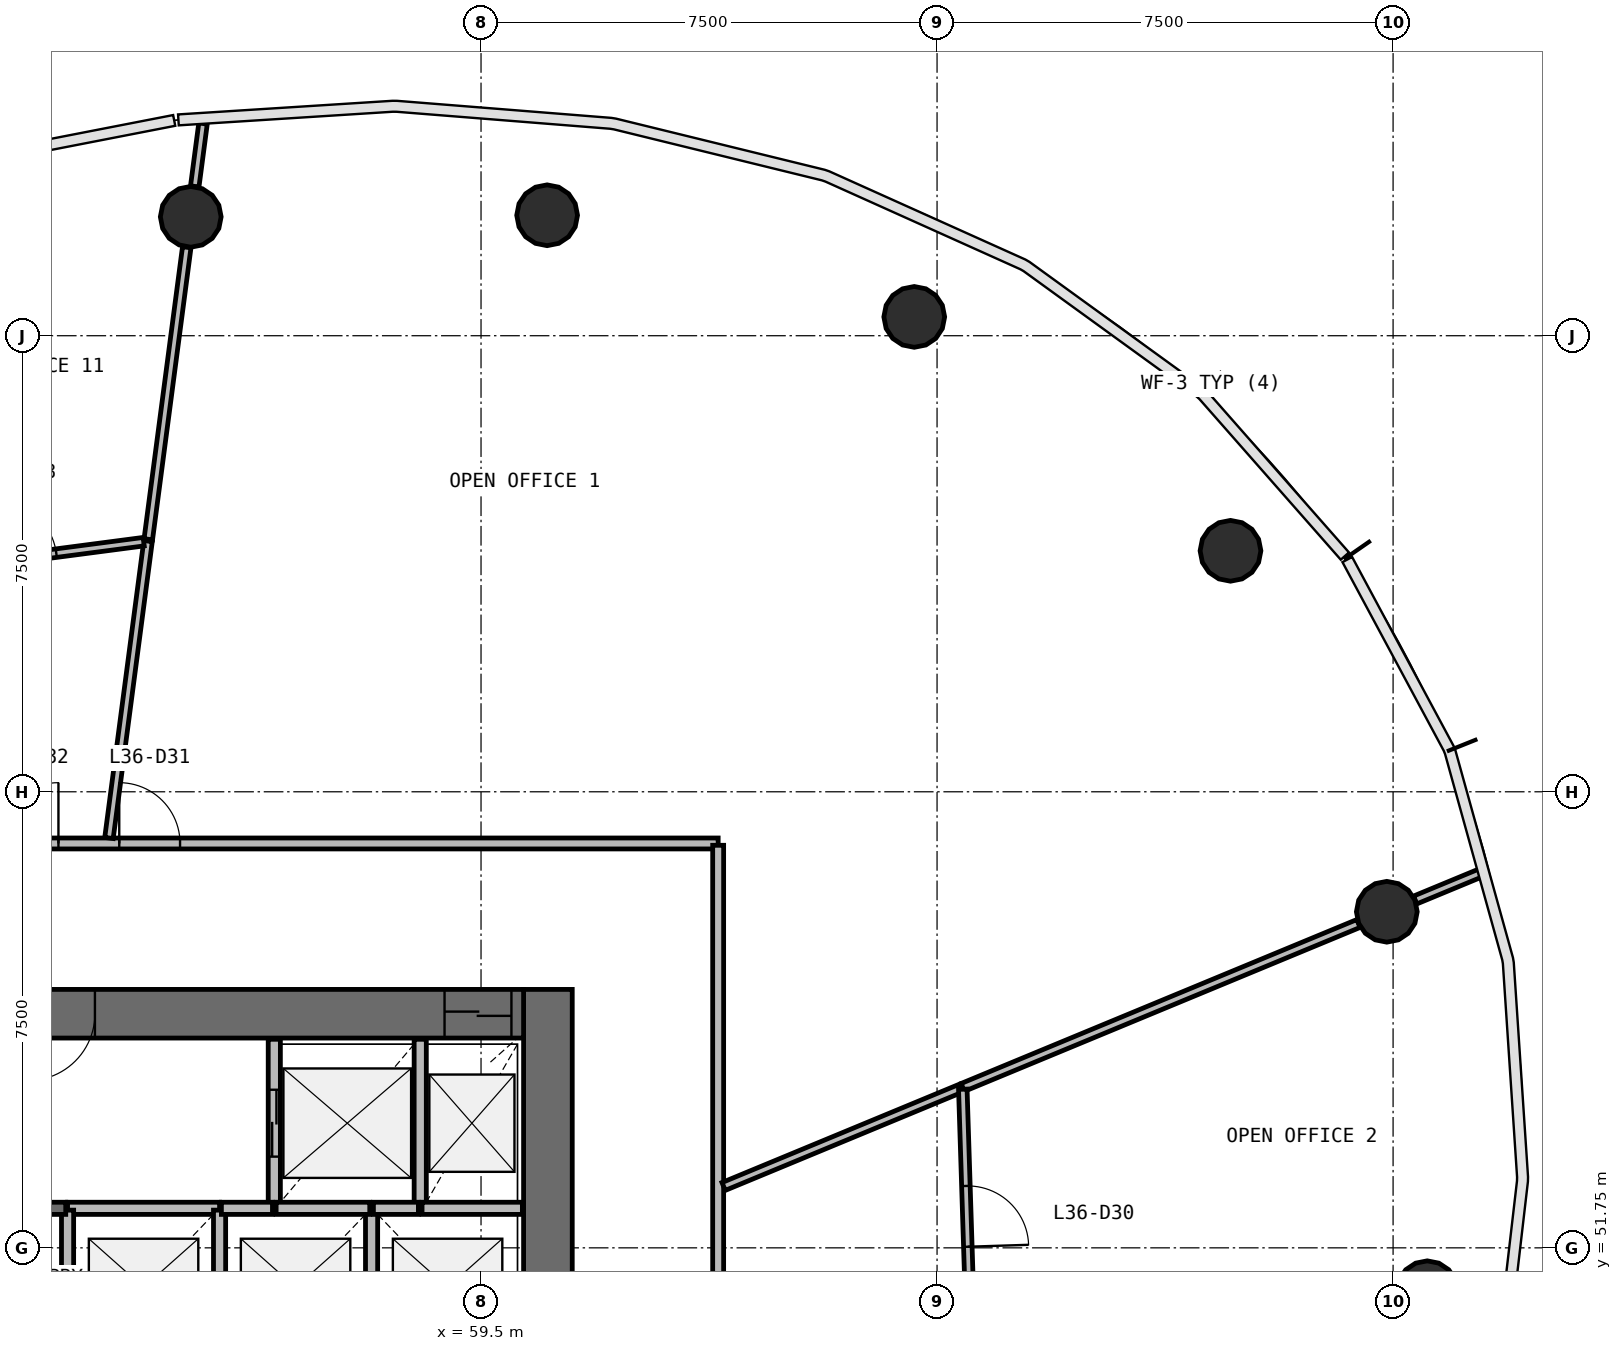
"""IFC4 building model, lengths in metres.
Left out: names, types, materials, properties, quantities, classifications, styles, units other than length and angle.
Written with IfcOpenShell. Run it as: python <this file> out.ifc"""

import sys

from ifc_helpers import new_model, si_unit, direction, frame, frame_2d, origin, origin_2d, place, context, subcontext, project, spatial, rectangle, circle, extrude, source, transform, mapped, element, fill, save


model = new_model("IFC4")
c1 = context("Model", 3, precision=1e-05, world=origin(), true_north=direction((0.0, 1.0)))
c2 = subcontext(c1, "Body", "Model", "MODEL_VIEW")
j1 = project(units=[si_unit("LENGTHUNIT", "METRE"), si_unit("PLANEANGLEUNIT", "RADIAN")], contexts=[c1])
p1 = place(None, origin())
s1 = spatial("IfcSite", under=j1, at=p1, CompositionType="ELEMENT")
p2 = place(p1, origin())
s2 = spatial("IfcBuilding", under=s1, at=p2, CompositionType="ELEMENT")
p3 = place(p2, frame((0.0, 0.0, 152.6)))
s3 = spatial("IfcBuildingStorey", under=s2, at=p3, CompositionType="ELEMENT", Elevation=152.6)
p4 = place(p3, frame((60.6, 40.0, 0.0), z_axis=(0.0, 0.0, 1.0), x_axis=(0.0, 1.0, 0.0)))
e1 = element("IfcWall", 1, at=p4, inside=s3, PredefinedType="SHEAR", context=c2, shape_type="SweptSolid", body=[
    extrude(rectangle(XDim=16.0, YDim=0.8, at=frame_2d((8.0, 0.0))), origin(), (0.0, 0.0, 1.0), 3.9),
])
p5 = place(p4, frame((7.1, 0.0, 0.0)))
e2 = element("IfcOpeningElement", 2, at=p5, cuts=e1, PredefinedType="OPENING", context=c2, shape_type="SweptSolid", body=[
    extrude(rectangle(XDim=1.8, YDim=2.1, at=frame_2d((0.9, 1.05))), frame((0.0, 0.41, 0.0), z_axis=(0.0, -1.0, 0.0), x_axis=(1.0, 0.0, 0.0)), (0.0, 0.0, 1.0), 0.82),
])
p6 = place(p3, frame((60.2, 55.6, 0.0), z_axis=(0.0, 0.0, 1.0), x_axis=(-1.0, 0.0, 0.0)))
e3 = element("IfcWall", 3, at=p6, inside=s3, PredefinedType="SHEAR", context=c2, shape_type="SweptSolid", body=[
    extrude(rectangle(XDim=16.4, YDim=0.8, at=frame_2d((8.2, 0.0))), origin(), (0.0, 0.0, 1.0), 3.9),
])
p7 = place(p6, frame((0.2, 0.0, 0.0)))
e4 = element("IfcOpeningElement", 4, at=p7, cuts=e3, PredefinedType="OPENING", context=c2, shape_type="SweptSolid", body=[
    extrude(rectangle(XDim=1.1, YDim=2.1, at=frame_2d((0.55, 1.05))), frame((0.0, 0.41, 0.0), z_axis=(0.0, -1.0, 0.0), x_axis=(1.0, 0.0, 0.0)), (0.0, 0.0, 1.0), 0.82),
])
p8 = place(p6, frame((10.1, 0.0, 0.0)))
e5 = element("IfcOpeningElement", 5, at=p8, cuts=e3, PredefinedType="OPENING", context=c2, shape_type="SweptSolid", body=[
    extrude(rectangle(XDim=1.2, YDim=2.1, at=frame_2d((0.6, 1.05))), frame((0.0, 0.41, 0.0), z_axis=(0.0, -1.0, 0.0), x_axis=(1.0, 0.0, 0.0)), (0.0, 0.0, 1.0), 0.82),
])
p9 = place(p6, frame((7.05, 0.0, 0.0)))
e6 = element("IfcOpeningElement", 6, at=p9, cuts=e3, PredefinedType="OPENING", context=c2, shape_type="SweptSolid", body=[
    extrude(rectangle(XDim=1.1, YDim=2.1, at=frame_2d((0.55, 1.05))), frame((0.0, 0.41, 0.0), z_axis=(0.0, -1.0, 0.0), x_axis=(1.0, 0.0, 0.0)), (0.0, 0.0, 1.0), 0.82),
])
m1 = source(origin(), c2, "Body", "SweptSolid", [
    extrude(circle(Radius=0.5, at=origin_2d()), origin(), (0.0, 0.0, 1.0), 3.9),
])
for number, where, z_axis, x_axis in (
    (7, (75.062, 51.036, 0.0), (0.0, 0.0, 1.0), (1.0, 0.0, 0.0)),
    (8, (74.397, 57.277, 0.0), (0.0, 0.0, 1.0), (1.0, 0.0, 0.0)),
    (9, (71.826, 63.213, 0.0), (0.0, 0.0, 1.0), (1.0, 0.0, 0.0)),
    (10, (66.625, 67.06, 0.0), (0.0, 0.0, 1.0), (1.0, 0.0, 0.0)),
    (11, (60.587, 68.731, 0.0), (0.0, 0.0, 1.0), (1.0, 0.0, 0.0)),
    (12, (54.726, 68.705, 0.0), (0.0, 0.0, 1.0), (1.0, 0.0, 0.0)),
):
    element("IfcColumn", number, at=place(p3, frame(where, z_axis=z_axis, x_axis=x_axis)), inside=s3, PredefinedType="COLUMN", context=c2, shape_type="MappedRepresentation", body=[
        mapped(m1, transform((0.0, 0.0, 0.0), scale=1.0)),
    ])
p10 = place(p3, frame((56.1, 55.18, 0.0), z_axis=(0.0, 0.0, 1.0), x_axis=(0.0, -1.0, 0.0)))
e13 = element("IfcWall", 13, at=p10, inside=s3, PredefinedType="SOLIDWALL", context=c2, shape_type="SweptSolid", body=[
    extrude(rectangle(XDim=2.78, YDim=0.2, at=frame_2d((1.39, 0.0))), origin(), (0.0, 0.0, 1.0), 3.58),
])
p11 = place(p10, frame((0.83, 0.0, 0.0)))
e14 = element("IfcOpeningElement", 14, at=p11, cuts=e13, PredefinedType="OPENING", context=c2, shape_type="SweptSolid", body=[
    extrude(rectangle(XDim=1.1, YDim=2.1, at=frame_2d((0.55, 1.05))), frame((0.0, 0.11, 0.0), z_axis=(0.0, -1.0, 0.0), x_axis=(1.0, 0.0, 0.0)), (0.0, 0.0, 1.0), 0.22),
])
p12 = place(p3, frame((58.5, 52.4, 0.0), z_axis=(0.0, 0.0, 1.0), x_axis=(0.0, 1.0, 0.0)))
e15 = element("IfcWall", 15, at=p12, inside=s3, PredefinedType="SOLIDWALL", context=c2, shape_type="SweptSolid", body=[
    extrude(rectangle(XDim=2.78, YDim=0.2, at=frame_2d((1.39, 0.0))), origin(), (0.0, 0.0, 1.0), 3.58),
])
p13 = place(p3, frame((55.2, 52.4, 0.0), z_axis=(0.0, 0.0, 1.0), x_axis=(-1.0, 0.0, 0.0)))
e16 = element("IfcWall", 16, at=p13, inside=s3, PredefinedType="SOLIDWALL", context=c2, shape_type="SweptSolid", body=[
    extrude(rectangle(XDim=2.5, YDim=0.2, at=frame_2d((1.25, 0.0))), origin(), (0.0, 0.0, 1.0), 3.58),
])
for number, where, z_axis, x_axis in (
    (17, (52.7, 52.37, 0.0), (0.0, 0.0, 1.0), (0.0, -1.0, 0.0)),
    (18, (55.2, 50.01, 0.0), (0.0, 0.0, 1.0), (0.0, 1.0, 0.0)),
):
    element("IfcWall", number, at=place(p3, frame(where, z_axis=z_axis, x_axis=x_axis)), inside=s3, PredefinedType="SOLIDWALL", context=c2, shape_type="SweptSolid", body=[
        extrude(rectangle(XDim=2.36, YDim=0.2, at=frame_2d((1.18, 0.0))), origin(), (0.0, 0.0, 1.0), 3.58),
    ])
p14 = place(p3, frame((57.7, 50.01, 0.0), z_axis=(0.0, 0.0, 1.0), x_axis=(0.0, 1.0, 0.0)))
e19 = element("IfcWall", 19, at=p14, inside=s3, PredefinedType="SOLIDWALL", context=c2, shape_type="SweptSolid", body=[
    extrude(rectangle(XDim=2.39, YDim=0.2, at=frame_2d((1.195, 0.0))), origin(), (0.0, 0.0, 1.0), 3.58),
])
p15 = place(p3, frame((50.43, 52.4, 0.0), z_axis=(0.0, 0.0, 1.0), x_axis=(1.0, 0.0, 0.0)))
e20 = element("IfcWall", 20, at=p15, inside=s3, PredefinedType="SOLIDWALL", context=c2, shape_type="SweptSolid", body=[
    extrude(rectangle(XDim=2.24, YDim=0.2, at=frame_2d((1.12, 0.0))), origin(), (0.0, 0.0, 1.0), 3.58),
])
p16 = place(p3, frame((60.18, 52.4, 0.0), z_axis=(0.0, 0.0, 1.0), x_axis=(-1.0, 0.0, 0.0)))
e21 = element("IfcWall", 21, at=p16, inside=s3, PredefinedType="SOLIDWALL", context=c2, shape_type="SweptSolid", body=[
    extrude(rectangle(XDim=1.65, YDim=0.2, at=frame_2d((0.825, 0.0))), origin(), (0.0, 0.0, 1.0), 3.58),
])
p17 = place(p3, frame((57.67, 52.4, 0.0), z_axis=(0.0, 0.0, 1.0), x_axis=(-1.0, 0.0, 0.0)))
e22 = element("IfcWall", 22, at=p17, inside=s3, PredefinedType="SOLIDWALL", context=c2, shape_type="SweptSolid", body=[
    extrude(rectangle(XDim=1.54, YDim=0.2, at=frame_2d((0.77, 0.0))), origin(), (0.0, 0.0, 1.0), 3.58),
])
p18 = place(p3, frame((56.07, 52.4, 0.0), z_axis=(0.0, 0.0, 1.0), x_axis=(-1.0, 0.0, 0.0)))
e23 = element("IfcWall", 23, at=p18, inside=s3, PredefinedType="SOLIDWALL", context=c2, shape_type="SweptSolid", body=[
    extrude(rectangle(XDim=0.84, YDim=0.2, at=frame_2d((0.42, 0.0))), origin(), (0.0, 0.0, 1.0), 3.58),
])
p19 = place(p3, frame((58.47, 52.4, 0.0), z_axis=(0.0, 0.0, 1.0), x_axis=(-1.0, 0.0, 0.0)))
e24 = element("IfcWall", 24, at=p19, inside=s3, PredefinedType="SOLIDWALL", context=c2, shape_type="SweptSolid", body=[
    extrude(rectangle(XDim=0.74, YDim=0.2, at=frame_2d((0.37, 0.0))), origin(), (0.0, 0.0, 1.0), 3.58),
])
p20 = place(p3, frame((40.6, 58.4, 0.0), z_axis=(0.0, 0.0, 1.0), x_axis=(1.0, 0.0, 0.0)))
e25 = element("IfcWall", 25, at=p20, inside=s3, PredefinedType="PARTITIONING", context=c2, shape_type="SweptSolid", body=[
    extrude(rectangle(XDim=22.8, YDim=0.18, at=frame_2d((11.4, 0.0))), origin(), (0.0, 0.0, 1.0), 2.88),
])
p21 = place(p20, frame((12.95, 0.0, 0.0)))
e26 = element("IfcOpeningElement", 26, at=p21, cuts=e25, PredefinedType="OPENING", context=c2, shape_type="SweptSolid", body=[
    extrude(rectangle(XDim=1.0, YDim=2.1, at=frame_2d((0.5, 1.05))), frame((0.0, 0.1, 0.0), z_axis=(0.0, -1.0, 0.0), x_axis=(1.0, 0.0, 0.0)), (0.0, 0.0, 1.0), 0.2),
])
p22 = place(p20, frame((10.95, 0.0, 0.0)))
e27 = element("IfcOpeningElement", 27, at=p22, cuts=e25, PredefinedType="OPENING", context=c2, shape_type="SweptSolid", body=[
    extrude(rectangle(XDim=1.0, YDim=2.1, at=frame_2d((0.5, 1.05))), frame((0.0, 0.1, 0.0), z_axis=(0.0, -1.0, 0.0), x_axis=(1.0, 0.0, 0.0)), (0.0, 0.0, 1.0), 0.2),
])
p23 = place(p3, frame((63.4, 58.37, 0.0), z_axis=(0.0, 0.0, 1.0), x_axis=(0.0, -1.0, 0.0)))
e28 = element("IfcWall", 28, at=p23, inside=s3, PredefinedType="PARTITIONING", context=c2, shape_type="SweptSolid", body=[
    extrude(rectangle(XDim=20.74, YDim=0.18, at=frame_2d((10.37, 0.0))), origin(), (0.0, 0.0, 1.0), 2.88),
])
p24 = place(p23, frame((15.49, 0.0, 0.0)))
e29 = element("IfcOpeningElement", 29, at=p24, cuts=e28, PredefinedType="OPENING", context=c2, shape_type="SweptSolid", body=[
    extrude(rectangle(XDim=1.0, YDim=2.1, at=frame_2d((0.5, 1.05))), frame((0.0, 0.1, 0.0), z_axis=(0.0, -1.0, 0.0), x_axis=(1.0, 0.0, 0.0)), (0.0, 0.0, 1.0), 0.2),
])
p25 = place(p23, frame((9.89, 0.0, 0.0)))
e30 = element("IfcOpeningElement", 30, at=p25, cuts=e28, PredefinedType="OPENING", context=c2, shape_type="SweptSolid", body=[
    extrude(rectangle(XDim=1.0, YDim=2.1, at=frame_2d((0.5, 1.05))), frame((0.0, 0.1, 0.0), z_axis=(0.0, -1.0, 0.0), x_axis=(1.0, 0.0, 0.0)), (0.0, 0.0, 1.0), 0.2),
])
p26 = place(p3, frame((67.423, 54.388, 0.0), z_axis=(0.0, 0.0, 1.0), x_axis=(0.923877847589, 0.382687500102, 0.0)))
e31 = element("IfcWall", 31, at=p26, inside=s3, PredefinedType="PARTITIONING", context=c2, shape_type="SweptSolid", body=[
    extrude(rectangle(XDim=7.044, YDim=0.14, at=frame_2d((3.522, 0.0))), origin(), (0.0, 0.0, 1.0), 2.88),
])
p27 = place(p3, frame((53.381, 58.49, 0.0), z_axis=(0.0, 0.0, 1.0), x_axis=(0.130523758186, 0.991445181817, 0.0)))
e32 = element("IfcWall", 32, at=p27, inside=s3, PredefinedType="PARTITIONING", context=c2, shape_type="SweptSolid", body=[
    extrude(rectangle(XDim=4.925, YDim=0.14, at=frame_2d((2.462, 0.0))), origin(), (0.0, 0.0, 1.0), 2.88),
])
p28 = place(p3, frame((54.028, 63.402, 0.0), z_axis=(0.0, 0.0, 1.0), x_axis=(0.130532734851, 0.991443999998, 0.0)))
e33 = element("IfcWall", 33, at=p28, inside=s3, PredefinedType="PARTITIONING", context=c2, shape_type="SweptSolid", body=[
    extrude(rectangle(XDim=4.844, YDim=0.14, at=frame_2d((2.422, 0.0))), origin(), (0.0, 0.0, 1.0), 2.88),
])
p29 = place(p3, frame((63.49, 52.759, 0.0), z_axis=(0.0, 0.0, 1.0), x_axis=(0.923878137975, 0.382686799055, 0.0)))
e34 = element("IfcWall", 34, at=p29, inside=s3, PredefinedType="PARTITIONING", context=c2, shape_type="SweptSolid", body=[
    extrude(rectangle(XDim=4.227, YDim=0.14, at=frame_2d((2.113, 0.0))), origin(), (0.0, 0.0, 1.0), 2.88),
])
p30 = place(p3, frame((67.424, 54.358, 0.0), z_axis=(0.0, 0.0, 1.0), x_axis=(0.031887030208, -0.999491479356, 0.0)))
e35 = element("IfcWall", 35, at=p30, inside=s3, PredefinedType="PARTITIONING", context=c2, shape_type="SweptSolid", body=[
    extrude(rectangle(XDim=4.242, YDim=0.14, at=frame_2d((2.121, 0.0))), origin(), (0.0, 0.0, 1.0), 2.88),
])
p31 = place(p30, frame((1.592, 0.0, 0.0)))
e36 = element("IfcOpeningElement", 36, at=p31, cuts=e35, PredefinedType="OPENING", context=c2, shape_type="SweptSolid", body=[
    extrude(rectangle(XDim=1.0, YDim=2.1, at=frame_2d((0.5, 1.05))), frame((0.0, 0.08, 0.0), z_axis=(0.0, -1.0, 0.0), x_axis=(1.0, 0.0, 0.0)), (0.0, 0.0, 1.0), 0.16),
])
p32 = place(p3, frame((50.075, 62.854, 0.0), z_axis=(0.0, 0.0, 1.0), x_axis=(0.991491442794, 0.130171882012, 0.0)))
e37 = element("IfcWall", 37, at=p32, inside=s3, PredefinedType="PARTITIONING", context=c2, shape_type="SweptSolid", body=[
    extrude(rectangle(XDim=3.91, YDim=0.14, at=frame_2d((1.955, 0.0))), origin(), (0.0, 0.0, 1.0), 2.88),
])
p33 = place(p32, frame((1.461, 0.0, 0.0)))
e38 = element("IfcOpeningElement", 38, at=p33, cuts=e37, PredefinedType="OPENING", context=c2, shape_type="SweptSolid", body=[
    extrude(rectangle(XDim=1.0, YDim=2.1, at=frame_2d((0.5, 1.05))), frame((0.0, 0.08, 0.0), z_axis=(0.0, -1.0, 0.0), x_axis=(1.0, 0.0, 0.0)), (0.0, 0.0, 1.0), 0.16),
])
p34 = place(p3, frame((74.863, 57.47, 0.0), z_axis=(0.0, 0.0, 1.0), x_axis=(0.923882723383, 0.382675728829, 0.0)))
e39 = element("IfcWall", 39, at=p34, inside=s3, PredefinedType="PARTITIONING", context=c2, shape_type="SweptSolid", body=[
    extrude(rectangle(XDim=1.198, YDim=0.14, at=frame_2d((0.599, 0.0))), origin(), (0.0, 0.0, 1.0), 2.88),
])
p35 = place(p3, frame((54.792, 69.205, 0.0), z_axis=(0.0, 0.0, 1.0), x_axis=(0.130569518357, 0.991439156417, 0.0)))
e40 = element("IfcWall", 40, at=p35, inside=s3, PredefinedType="PARTITIONING", context=c2, shape_type="SweptSolid", body=[
    extrude(rectangle(XDim=1.043, YDim=0.14, at=frame_2d((0.522, 0.0))), origin(), (0.0, 0.0, 1.0), 2.88),
])
m2 = source(origin(), c2, "Body", "SweptSolid", [
    extrude(rectangle(XDim=1.1, YDim=2.1, at=frame_2d((0.55, 1.05))), frame((0.0, 0.025, 0.0), z_axis=(0.0, -1.0, 0.0), x_axis=(1.0, 0.0, 0.0)), (0.0, 0.0, 1.0), 0.05),
])
p36 = place(p11, origin())
e41 = element("IfcDoor", 41, at=p36, inside=s3, OperationType="DOUBLE_DOOR_SLIDING", PredefinedType="USERDEFINED", context=c2, shape_type="MappedRepresentation", body=[
    mapped(m2, transform((0.0, 0.0, 0.0), scale=1.0)),
])
fill(e14, e41)
p37 = place(p7, origin())
e42 = element("IfcDoor", 42, at=p37, inside=s3, OperationType="DOUBLE_DOOR_SLIDING", PredefinedType="USERDEFINED", context=c2, shape_type="MappedRepresentation", body=[
    mapped(m2, transform((0.0, 0.0, 0.0), scale=1.0)),
])
fill(e4, e42)
m3 = source(origin(), c2, "Body", "SweptSolid", [
    extrude(rectangle(XDim=1.1, YDim=2.1, at=frame_2d((0.55, 1.05))), frame((0.0, 0.025, 0.0), z_axis=(0.0, -1.0, 0.0), x_axis=(1.0, 0.0, 0.0)), (0.0, 0.0, 1.0), 0.05),
])
p38 = place(p9, origin())
e43 = element("IfcDoor", 43, at=p38, inside=s3, OperationType="SINGLE_SWING_RIGHT", PredefinedType="DOOR", context=c2, shape_type="MappedRepresentation", body=[
    mapped(m3, transform((0.0, 0.0, 0.0), scale=1.0)),
])
fill(e6, e43)
m4 = source(origin(), c2, "Body", "SweptSolid", [
    extrude(rectangle(XDim=1.0, YDim=2.1, at=frame_2d((0.5, 1.05))), frame((0.0, 0.025, 0.0), z_axis=(0.0, -1.0, 0.0), x_axis=(1.0, 0.0, 0.0)), (0.0, 0.0, 1.0), 0.05),
])
p39 = place(p31, origin())
e44 = element("IfcDoor", 44, at=p39, inside=s3, OperationType="SINGLE_SWING_RIGHT", PredefinedType="DOOR", context=c2, shape_type="MappedRepresentation", body=[
    mapped(m4, transform((0.0, 0.0, 0.0), scale=1.0)),
])
fill(e36, e44)
p40 = place(p21, origin())
e45 = element("IfcDoor", 45, at=p40, inside=s3, OperationType="SINGLE_SWING_LEFT", PredefinedType="DOOR", context=c2, shape_type="MappedRepresentation", body=[
    mapped(m4, transform((0.0, 0.0, 0.0), scale=1.0)),
])
fill(e26, e45)
p41 = place(p22, origin())
e46 = element("IfcDoor", 46, at=p41, inside=s3, OperationType="SINGLE_SWING_RIGHT", PredefinedType="DOOR", context=c2, shape_type="MappedRepresentation", body=[
    mapped(m4, transform((0.0, 0.0, 0.0), scale=1.0)),
])
fill(e27, e46)
p42 = place(p33, origin())
e47 = element("IfcDoor", 47, at=p42, inside=s3, OperationType="SINGLE_SWING_LEFT", PredefinedType="DOOR", context=c2, shape_type="MappedRepresentation", body=[
    mapped(m4, transform((0.0, 0.0, 0.0), scale=1.0)),
])
fill(e38, e47)
save(model, sys.argv[1])
